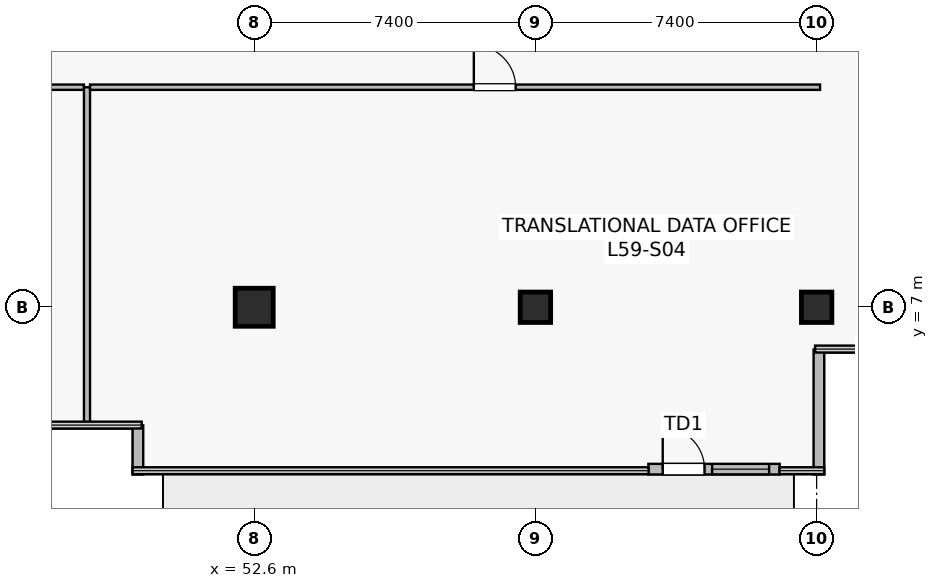
"""IFC4 building model, lengths in metres.
Left out: names, types, materials, properties, quantities, classifications, styles, units other than length and angle.
Written with IfcOpenShell. Run it as: python <this file> out.ifc"""

import sys

from ifc_helpers import new_model, si_unit, direction, frame, frame_2d, origin, origin_2d, place, context, subcontext, project, spatial, rectangle, extrude, source, transform, mapped, element, fill, save


model = new_model("IFC4")
c1 = context("Model", 3, precision=1e-05, world=origin(), true_north=direction((0.0, 1.0)))
c2 = subcontext(c1, "Body", "Model", "MODEL_VIEW")
j1 = project(units=[si_unit("LENGTHUNIT", "METRE"), si_unit("PLANEANGLEUNIT", "RADIAN")], contexts=[c1])
p1 = place(None, origin())
s1 = spatial("IfcSite", under=j1, at=p1, CompositionType="ELEMENT")
p2 = place(p1, origin())
s2 = spatial("IfcBuilding", under=s1, at=p2, CompositionType="ELEMENT")
p3 = place(p2, frame((0.0, 0.0, 246.5)))
s3 = spatial("IfcBuildingStorey", under=s2, at=p3, CompositionType="ELEMENT", Elevation=246.5)
m1 = source(origin(), c2, "Body", "SweptSolid", [
    extrude(rectangle(XDim=1.0, YDim=1.0, at=origin_2d()), origin(), (0.0, 0.0, 1.0), 4.1),
])
p4 = place(p3, frame((52.6, 7.0, 0.0), z_axis=(0.0, 0.0, 1.0), x_axis=(1.0, 0.0, 0.0)))
e1 = element("IfcColumn", 1, at=p4, inside=s3, PredefinedType="COLUMN", context=c2, shape_type="MappedRepresentation", body=[
    mapped(m1, transform((0.0, 0.0, 0.0), scale=1.0)),
])
m2 = source(origin(), c2, "Body", "SweptSolid", [
    extrude(rectangle(XDim=0.8, YDim=0.8, at=origin_2d()), origin(), (0.0, 0.0, 1.0), 4.1),
])
for number, where, z_axis, x_axis in (
    (2, (60.0, 7.0, 0.0), (0.0, 0.0, 1.0), (1.0, 0.0, 0.0)),
    (3, (67.4, 7.0, 0.0), (0.0, 0.0, 1.0), (1.0, 0.0, 0.0)),
):
    element("IfcColumn", number, at=place(p3, frame(where, z_axis=z_axis, x_axis=x_axis)), inside=s3, PredefinedType="COLUMN", context=c2, shape_type="MappedRepresentation", body=[
        mapped(m2, transform((0.0, 0.0, 0.0), scale=1.0)),
    ])
p5 = place(p3, frame((62.972, 2.74, 0.0), z_axis=(0.0, 0.0, 1.0), x_axis=(1.0, 0.0, 0.0)))
e4 = element("IfcWall", 4, at=p5, inside=s3, PredefinedType="STANDARD", context=c2, shape_type="SweptSolid", body=[
    extrude(rectangle(XDim=3.456, YDim=0.28, at=frame_2d((1.728, 0.0))), origin(), (0.0, 0.0, 1.0), 3.8),
])
p6 = place(p5, frame((0.378, 0.0, 0.0)))
e5 = element("IfcOpeningElement", 5, at=p6, cuts=e4, PredefinedType="OPENING", context=c2, shape_type="SweptSolid", body=[
    extrude(rectangle(XDim=1.1, YDim=2.2, at=frame_2d((0.55, 1.1))), frame((0.0, 0.15, 0.0), z_axis=(0.0, -1.0, 0.0), x_axis=(1.0, 0.0, 0.0)), (0.0, 0.0, 1.0), 0.3),
])
p7 = place(p5, frame((1.678, 0.0, 0.9)))
e6 = element("IfcOpeningElement", 6, at=p7, cuts=e4, PredefinedType="OPENING", context=c2, shape_type="SweptSolid", body=[
    extrude(rectangle(XDim=1.5, YDim=2.2, at=frame_2d((0.75, 1.1))), frame((0.0, 0.15, 0.0), z_axis=(0.0, -1.0, 0.0), x_axis=(1.0, 0.0, 0.0)), (0.0, 0.0, 1.0), 0.3),
])
p8 = place(p3, frame((49.54, 3.893, 0.0), z_axis=(0.0, 0.0, 1.0), x_axis=(0.0, -1.0, 0.0)))
e7 = element("IfcWall", 7, at=p8, inside=s3, PredefinedType="STANDARD", context=c2, shape_type="SweptSolid", body=[
    extrude(rectangle(XDim=1.293, YDim=0.28, at=frame_2d((0.646, 0.0))), origin(), (0.0, 0.0, 1.0), 3.8),
])
p9 = place(p3, frame((67.46, 2.6, 0.0), z_axis=(0.0, 0.0, 1.0), x_axis=(0.0, 1.0, 0.0)))
e8 = element("IfcWall", 8, at=p9, inside=s3, PredefinedType="STANDARD", context=c2, shape_type="SweptSolid", body=[
    extrude(rectangle(XDim=3.288, YDim=0.28, at=frame_2d((1.644, 0.0))), origin(), (0.0, 0.0, 1.0), 3.8),
])
p10 = place(p3, frame((30.88, 12.79, 0.0), z_axis=(0.0, 0.0, 1.0), x_axis=(1.0, 0.0, 0.0)))
e9 = element("IfcWall", 9, at=p10, inside=s3, PredefinedType="PARTITIONING", context=c2, shape_type="SweptSolid", body=[
    extrude(rectangle(XDim=17.24, YDim=0.14, at=frame_2d((8.62, 0.0))), origin(), (0.0, 0.0, 1.0), 3.197),
])
p11 = place(p10, frame((7.144, 0.0, 0.0)))
e10 = element("IfcOpeningElement", 10, at=p11, cuts=e9, PredefinedType="OPENING", context=c2, shape_type="SweptSolid", body=[
    extrude(rectangle(XDim=1.1, YDim=2.18, at=frame_2d((0.55, 1.09))), frame((0.0, 0.08, 0.0), z_axis=(0.0, -1.0, 0.0), x_axis=(1.0, 0.0, 0.0)), (0.0, 0.0, 1.0), 0.16),
])
p12 = place(p3, frame((48.2, 3.91, 0.0), z_axis=(0.0, 0.0, 1.0), x_axis=(0.0, 1.0, 0.0)))
e11 = element("IfcWall", 11, at=p12, inside=s3, PredefinedType="PARTITIONING", context=c2, shape_type="SweptSolid", body=[
    extrude(rectangle(XDim=8.88, YDim=0.16, at=frame_2d((4.44, 0.0))), origin(), (0.0, 0.0, 1.0), 3.135),
])
p13 = place(p3, frame((48.28, 12.79, 0.0), z_axis=(0.0, 0.0, 1.0), x_axis=(1.0, 0.0, 0.0)))
e12 = element("IfcWall", 12, at=p13, inside=s3, PredefinedType="PARTITIONING", context=c2, shape_type="SweptSolid", body=[
    extrude(rectangle(XDim=19.21, YDim=0.14, at=frame_2d((9.605, 0.0))), origin(), (0.0, 0.0, 1.0), 3.197),
])
p14 = place(p13, frame((10.1, 0.0, 0.0)))
e13 = element("IfcOpeningElement", 13, at=p14, cuts=e12, PredefinedType="OPENING", context=c2, shape_type="SweptSolid", body=[
    extrude(rectangle(XDim=1.1, YDim=2.18, at=frame_2d((0.55, 1.09))), frame((0.0, 0.08, 0.0), z_axis=(0.0, -1.0, 0.0), x_axis=(1.0, 0.0, 0.0)), (0.0, 0.0, 1.0), 0.16),
])
m3 = source(origin(), c2, "Body", "SweptSolid", [
    extrude(rectangle(XDim=1.1, YDim=2.2, at=frame_2d((0.55, 1.1))), frame((0.0, 0.025, 0.0), z_axis=(0.0, -1.0, 0.0), x_axis=(1.0, 0.0, 0.0)), (0.0, 0.0, 1.0), 0.05),
])
p15 = place(p6, origin())
e14 = element("IfcDoor", 14, at=p15, inside=s3, OperationType="SINGLE_SWING_LEFT", PredefinedType="DOOR", context=c2, shape_type="MappedRepresentation", body=[
    mapped(m3, transform((0.0, 0.0, 0.0), scale=1.0)),
])
fill(e5, e14)
m4 = source(origin(), c2, "Body", "SweptSolid", [
    extrude(rectangle(XDim=1.5, YDim=2.2, at=frame_2d((0.75, 1.1))), frame((0.0, 0.03, 0.0), z_axis=(0.0, -1.0, 0.0), x_axis=(1.0, 0.0, 0.0)), (0.0, 0.0, 1.0), 0.06),
])
p16 = place(p7, origin())
e15 = element("IfcWindow", 15, at=p16, inside=s3, PartitioningType="SINGLE_PANEL", PredefinedType="WINDOW", context=c2, shape_type="MappedRepresentation", body=[
    mapped(m4, transform((0.0, 0.0, 0.0), scale=1.0)),
])
fill(e6, e15)
m5 = source(origin(), c2, "Body", "SweptSolid", [
    extrude(rectangle(XDim=1.1, YDim=2.18, at=frame_2d((0.55, 1.09))), frame((0.0, 0.025, 0.0), z_axis=(0.0, -1.0, 0.0), x_axis=(1.0, 0.0, 0.0)), (0.0, 0.0, 1.0), 0.05),
])
p17 = place(p14, origin())
e16 = element("IfcDoor", 16, at=p17, inside=s3, OperationType="SINGLE_SWING_LEFT", PredefinedType="DOOR", context=c2, shape_type="MappedRepresentation", body=[
    mapped(m5, transform((0.0, 0.0, 0.0), scale=1.0)),
])
fill(e13, e16)
save(model, sys.argv[1])
